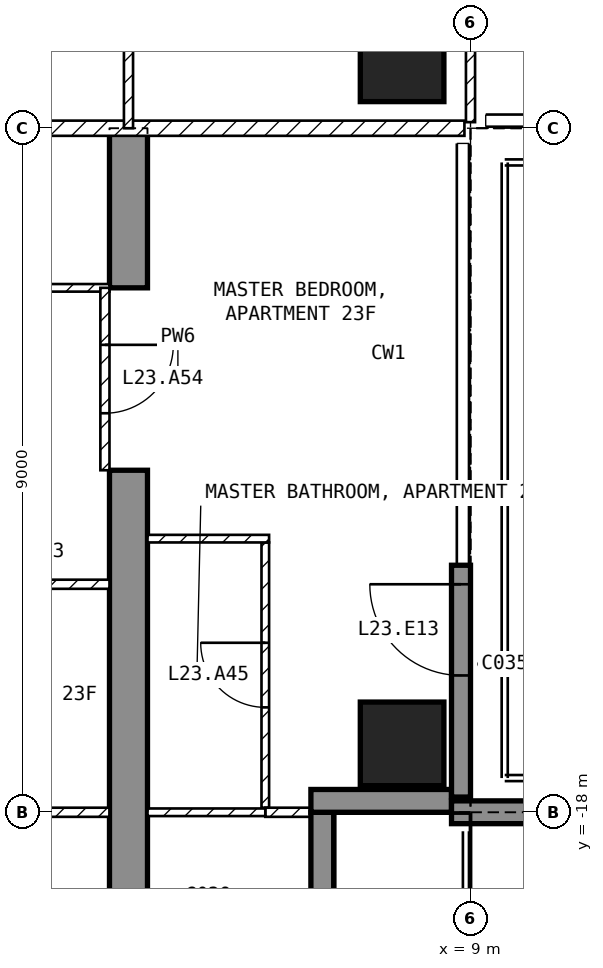
"""IFC4 building model, lengths in metres.
Left out: names, types, materials, properties, quantities, classifications, styles, units other than length and angle.
Written with IfcOpenShell. Run it as: python <this file> out.ifc"""

import sys

from ifc_helpers import new_model, si_unit, direction, frame, frame_2d, origin, origin_2d, place, context, subcontext, project, spatial, polyline, rectangle, outline, extrude, element, fill, save


model = new_model("IFC4")
c1 = context("Model", 3, precision=1e-05, world=origin(), true_north=direction((0.0, 1.0)))
c2 = subcontext(c1, "Body", "Model", "MODEL_VIEW")
j1 = project(units=[si_unit("LENGTHUNIT", "METRE"), si_unit("PLANEANGLEUNIT", "RADIAN")], contexts=[c1])
p1 = place(None, origin())
s1 = spatial("IfcSite", under=j1, at=p1, CompositionType="ELEMENT")
p2 = place(p1, origin())
s2 = spatial("IfcBuilding", under=s1, at=p2, CompositionType="ELEMENT")
p3 = place(p2, frame((0.0, 0.0, 102.4)))
s3 = spatial("IfcBuildingStorey", under=s2, at=p3, CompositionType="ELEMENT", Elevation=102.4)
for number, where, z_axis, x_axis in (
    (1, (8.1, -17.1, -0.25), (0.0, 0.0, 1.0), (1.0, 0.0, 0.0)),
    (2, (8.1, -8.1, -0.25), (0.0, 0.0, 1.0), (1.0, 0.0, 0.0)),
):
    element("IfcColumn", number, at=place(p3, frame(where, z_axis=z_axis, x_axis=x_axis)), inside=s3, PredefinedType="COLUMN", context=c2, shape_type="SweptSolid", body=[
        extrude(rectangle(XDim=1.1, YDim=1.1, at=origin_2d()), origin(), (0.0, 0.0, 1.0), 3.5),
    ])
p4 = place(p3, frame((4.25, -20.15, -0.25), z_axis=(1.0, 0.0, 0.0), x_axis=(0.0, 1.0, 0.0)))
e3 = element("IfcWall", 3, at=p4, inside=s3, PredefinedType="SHEAR", context=c2, shape_type="SweptSolid", body=[
    extrude(outline(polyline([(0.0, 0.0), (6.65, 0.0), (6.65, 2.65), (9.05, 2.65), (9.05, 0.0), (11.15, 0.0), (11.15, 3.5), (0.0, 3.5), (0.0, 0.0)])), origin(), (0.0, 0.0, 1.0), 0.5),
])
p5 = place(p3, frame((8.875, -17.8, 0.0), z_axis=(0.0, 0.0, 1.0), x_axis=(0.0, 1.0, 0.0)))
e4 = element("IfcWall", 4, at=p5, inside=s3, PredefinedType="SOLIDWALL", context=c2, shape_type="SweptSolid", body=[
    extrude(rectangle(XDim=3.05, YDim=0.25, at=frame_2d((1.525, 0.0))), origin(), (0.0, 0.0, 1.0), 3.25),
])
p6 = place(p5, frame((1.6, 0.0, 0.0)))
e5 = element("IfcOpeningElement", 5, at=p6, cuts=e4, PredefinedType="OPENING", context=c2, shape_type="SweptSolid", body=[
    extrude(rectangle(XDim=1.2, YDim=2.4, at=frame_2d((0.6, 1.2))), frame((0.0, 0.135, 0.0), z_axis=(0.0, -1.0, 0.0), x_axis=(1.0, 0.0, 0.0)), (0.0, 0.0, 1.0), 0.27),
])
p7 = place(p3, frame((7.05, -19.8, 0.0), z_axis=(0.0, 0.0, 1.0), x_axis=(0.0, 1.0, 0.0)))
e6 = element("IfcWall", 6, at=p7, inside=s3, PredefinedType="SOLIDWALL", context=c2, shape_type="SweptSolid", body=[
    extrude(rectangle(XDim=1.8, YDim=0.3, at=frame_2d((0.9, 0.0))), origin(), (0.0, 0.0, 1.0), 3.25),
])
p8 = place(p3, frame((6.9, -17.85, 0.0), z_axis=(0.0, 0.0, 1.0), x_axis=(1.0, 0.0, 0.0)))
e7 = element("IfcWall", 7, at=p8, inside=s3, PredefinedType="SOLIDWALL", context=c2, shape_type="SweptSolid", body=[
    extrude(rectangle(XDim=1.85, YDim=0.3, at=frame_2d((0.925, 0.0))), origin(), (0.0, 0.0, 1.0), 3.25),
])
p9 = place(p3, frame((8.75, -18.0, 0.0), z_axis=(0.0, 0.0, 1.0), x_axis=(1.0, 0.0, 0.0)))
e8 = element("IfcWall", 8, at=p9, inside=s3, PredefinedType="SOLIDWALL", context=c2, shape_type="SweptSolid", body=[
    extrude(rectangle(XDim=2.99, YDim=0.3, at=frame_2d((1.495, 0.0))), origin(), (0.0, 0.0, 1.0), 3.25),
])
p10 = place(p3, frame((8.92, -9.0, 0.0), z_axis=(0.0, 0.0, 1.0), x_axis=(-1.0, 0.0, 0.0)))
e9 = element("IfcWall", 9, at=p10, inside=s3, PredefinedType="PARTITIONING", context=c2, shape_type="SweptSolid", body=[
    extrude(rectangle(XDim=17.84, YDim=0.2, at=frame_2d((8.92, 0.0))), origin(), (0.0, 0.0, 1.0), 3.25),
])
p11 = place(p10, frame((8.42, 0.0, 0.0)))
e10 = element("IfcOpeningElement", 10, at=p11, cuts=e9, PredefinedType="OPENING", context=c2, shape_type="SweptSolid", body=[
    extrude(rectangle(XDim=1.0, YDim=2.1, at=frame_2d((0.5, 1.05))), frame((0.0, 0.11, 0.0), z_axis=(0.0, -1.0, 0.0), x_axis=(1.0, 0.0, 0.0)), (0.0, 0.0, 1.0), 0.22),
])
p12 = place(p3, frame((9.0, -8.92, 0.0), z_axis=(0.0, 0.0, 1.0), x_axis=(0.0, 1.0, 0.0)))
e11 = element("IfcWall", 11, at=p12, inside=s3, PredefinedType="PARTITIONING", context=c2, shape_type="SweptSolid", body=[
    extrude(rectangle(XDim=7.62, YDim=0.12, at=frame_2d((3.81, 0.0))), origin(), (0.0, 0.0, 1.0), 3.25),
])
p13 = place(p12, frame((2.52, 0.0, 0.0)))
e12 = element("IfcOpeningElement", 12, at=p13, cuts=e11, PredefinedType="OPENING", context=c2, shape_type="SweptSolid", body=[
    extrude(rectangle(XDim=0.9, YDim=2.1, at=frame_2d((0.45, 1.05))), frame((0.0, 0.07, 0.0), z_axis=(0.0, -1.0, 0.0), x_axis=(1.0, 0.0, 0.0)), (0.0, 0.0, 1.0), 0.14),
])
p14 = place(p3, frame((4.5, -9.0, 0.0), z_axis=(0.0, 0.0, 1.0), x_axis=(0.0, 1.0, 0.0)))
e13 = element("IfcWall", 13, at=p14, inside=s3, PredefinedType="PARTITIONING", context=c2, shape_type="SweptSolid", body=[
    extrude(rectangle(XDim=4.5, YDim=0.12, at=frame_2d((2.25, 0.0))), origin(), (0.0, 0.0, 1.0), 3.25),
])
p15 = place(p14, frame((1.8, 0.0, 0.0)))
e14 = element("IfcOpeningElement", 14, at=p15, cuts=e13, PredefinedType="OPENING", context=c2, shape_type="SweptSolid", body=[
    extrude(rectangle(XDim=0.9, YDim=2.1, at=frame_2d((0.45, 1.05))), frame((0.0, 0.07, 0.0), z_axis=(0.0, -1.0, 0.0), x_axis=(1.0, 0.0, 0.0)), (0.0, 0.0, 1.0), 0.14),
])
p16 = place(p3, frame((4.25, -11.1, 0.0), z_axis=(0.0, 0.0, 1.0), x_axis=(-1.0, 0.0, 0.0)))
e15 = element("IfcWall", 15, at=p16, inside=s3, PredefinedType="PARTITIONING", context=c2, shape_type="SweptSolid", body=[
    extrude(rectangle(XDim=2.15, YDim=0.1, at=frame_2d((1.075, 0.0))), origin(), (0.0, 0.0, 1.0), 3.25),
])
p17 = place(p3, frame((4.25, -15.0, 0.0), z_axis=(0.0, 0.0, 1.0), x_axis=(-1.0, 0.0, 0.0)))
e16 = element("IfcWall", 16, at=p17, inside=s3, PredefinedType="PARTITIONING", context=c2, shape_type="SweptSolid", body=[
    extrude(rectangle(XDim=3.81, YDim=0.12, at=frame_2d((1.905, 0.0))), origin(), (0.0, 0.0, 1.0), 3.25),
])
p18 = place(p17, frame((1.425, 0.0, 0.0)))
e17 = element("IfcOpeningElement", 17, at=p18, cuts=e16, PredefinedType="OPENING", context=c2, shape_type="SweptSolid", body=[
    extrude(rectangle(XDim=0.9, YDim=2.1, at=frame_2d((0.45, 1.05))), frame((0.0, 0.07, 0.0), z_axis=(0.0, -1.0, 0.0), x_axis=(1.0, 0.0, 0.0)), (0.0, 0.0, 1.0), 0.14),
])
p19 = place(p3, frame((4.25, -18.0, 0.0), z_axis=(0.0, 0.0, 1.0), x_axis=(-1.0, 0.0, 0.0)))
e18 = element("IfcWall", 18, at=p19, inside=s3, PredefinedType="PARTITIONING", context=c2, shape_type="SweptSolid", body=[
    extrude(rectangle(XDim=8.5, YDim=0.12, at=frame_2d((4.25, 0.0))), origin(), (0.0, 0.0, 1.0), 3.25),
])
p20 = place(p19, frame((5.675, 0.0, 0.0)))
e19 = element("IfcOpeningElement", 19, at=p20, cuts=e18, PredefinedType="OPENING", context=c2, shape_type="SweptSolid", body=[
    extrude(rectangle(XDim=0.9, YDim=2.1, at=frame_2d((0.45, 1.05))), frame((0.0, 0.07, 0.0), z_axis=(0.0, -1.0, 0.0), x_axis=(1.0, 0.0, 0.0)), (0.0, 0.0, 1.0), 0.14),
])
p21 = place(p3, frame((6.3, -17.94, 0.0), z_axis=(0.0, 0.0, 1.0), x_axis=(0.0, 1.0, 0.0)))
e20 = element("IfcWall", 20, at=p21, inside=s3, PredefinedType="PARTITIONING", context=c2, shape_type="SweptSolid", body=[
    extrude(rectangle(XDim=3.49, YDim=0.1, at=frame_2d((1.745, 0.0))), origin(), (0.0, 0.0, 1.0), 3.25),
])
p22 = place(p21, frame((1.32, 0.0, 0.0)))
e21 = element("IfcOpeningElement", 21, at=p22, cuts=e20, PredefinedType="OPENING", context=c2, shape_type="SweptSolid", body=[
    extrude(rectangle(XDim=0.85, YDim=2.1, at=frame_2d((0.425, 1.05))), frame((0.0, 0.06, 0.0), z_axis=(0.0, -1.0, 0.0), x_axis=(1.0, 0.0, 0.0)), (0.0, 0.0, 1.0), 0.12),
])
p23 = place(p3, frame((6.35, -14.4, 0.0), z_axis=(0.0, 0.0, 1.0), x_axis=(-1.0, 0.0, 0.0)))
e22 = element("IfcWall", 22, at=p23, inside=s3, PredefinedType="PARTITIONING", context=c2, shape_type="SweptSolid", body=[
    extrude(rectangle(XDim=1.6, YDim=0.1, at=frame_2d((0.8, 0.0))), origin(), (0.0, 0.0, 1.0), 3.25),
])
p24 = place(p3, frame((7.12, -18.0, 0.0), z_axis=(0.0, 0.0, 1.0), x_axis=(-1.0, 0.0, 0.0)))
e23 = element("IfcWall", 23, at=p24, inside=s3, PredefinedType="PARTITIONING", context=c2, shape_type="SweptSolid", body=[
    extrude(rectangle(XDim=0.82, YDim=0.12, at=frame_2d((0.41, 0.0))), origin(), (0.0, 0.0, 1.0), 3.25),
])
p25 = place(p3, frame((6.3, -18.0, 0.0), z_axis=(0.0, 0.0, 1.0), x_axis=(-1.0, 0.0, 0.0)))
e24 = element("IfcWall", 24, at=p25, inside=s3, PredefinedType="PARTITIONING", context=c2, shape_type="SweptSolid", body=[
    extrude(rectangle(XDim=1.55, YDim=0.1, at=frame_2d((0.775, 0.0))), origin(), (0.0, 0.0, 1.0), 3.25),
])
p26 = place(p3, frame((4.19, -11.1, 0.0), z_axis=(0.0, 0.0, 1.0), x_axis=(0.0, -1.0, 0.0)))
e25 = element("IfcWall", 25, at=p26, inside=s3, PredefinedType="PARTITIONING", context=c2, shape_type="SweptSolid", body=[
    extrude(rectangle(XDim=2.4, YDim=0.12, at=frame_2d((1.2, 0.0))), origin(), (0.0, 0.0, 1.0), 2.4),
])
p27 = place(p26, frame((0.75, 0.0, 0.0)))
e26 = element("IfcOpeningElement", 26, at=p27, cuts=e25, PredefinedType="OPENING", context=c2, shape_type="SweptSolid", body=[
    extrude(rectangle(XDim=0.9, YDim=2.1, at=frame_2d((0.45, 1.05))), frame((0.0, 0.07, 0.0), z_axis=(0.0, -1.0, 0.0), x_axis=(1.0, 0.0, 0.0)), (0.0, 0.0, 1.0), 0.14),
])
p28 = place(p6, origin())
e27 = element("IfcDoor", 27, at=p28, inside=s3, OperationType="SINGLE_SWING_RIGHT", PredefinedType="DOOR", context=c2, shape_type="SweptSolid", body=[
    extrude(rectangle(XDim=1.2, YDim=2.4, at=frame_2d((0.6, 1.2))), frame((0.0, 0.025, 0.0), z_axis=(0.0, -1.0, 0.0), x_axis=(1.0, 0.0, 0.0)), (0.0, 0.0, 1.0), 0.05),
])
fill(e5, e27)
p29 = place(p22, origin())
e28 = element("IfcDoor", 28, at=p29, inside=s3, OperationType="SINGLE_SWING_RIGHT", PredefinedType="DOOR", context=c2, shape_type="SweptSolid", body=[
    extrude(rectangle(XDim=0.85, YDim=2.1, at=frame_2d((0.425, 1.05))), frame((0.0, 0.025, 0.0), z_axis=(0.0, -1.0, 0.0), x_axis=(1.0, 0.0, 0.0)), (0.0, 0.0, 1.0), 0.05),
])
fill(e21, e28)
p30 = place(p27, origin())
e29 = element("IfcDoor", 29, at=p30, inside=s3, OperationType="SINGLE_SWING_LEFT", PredefinedType="DOOR", context=c2, shape_type="SweptSolid", body=[
    extrude(rectangle(XDim=0.9, YDim=2.1, at=frame_2d((0.45, 1.05))), frame((0.0, 0.025, 0.0), z_axis=(0.0, -1.0, 0.0), x_axis=(1.0, 0.0, 0.0)), (0.0, 0.0, 1.0), 0.05),
])
fill(e26, e29)
save(model, sys.argv[1])
